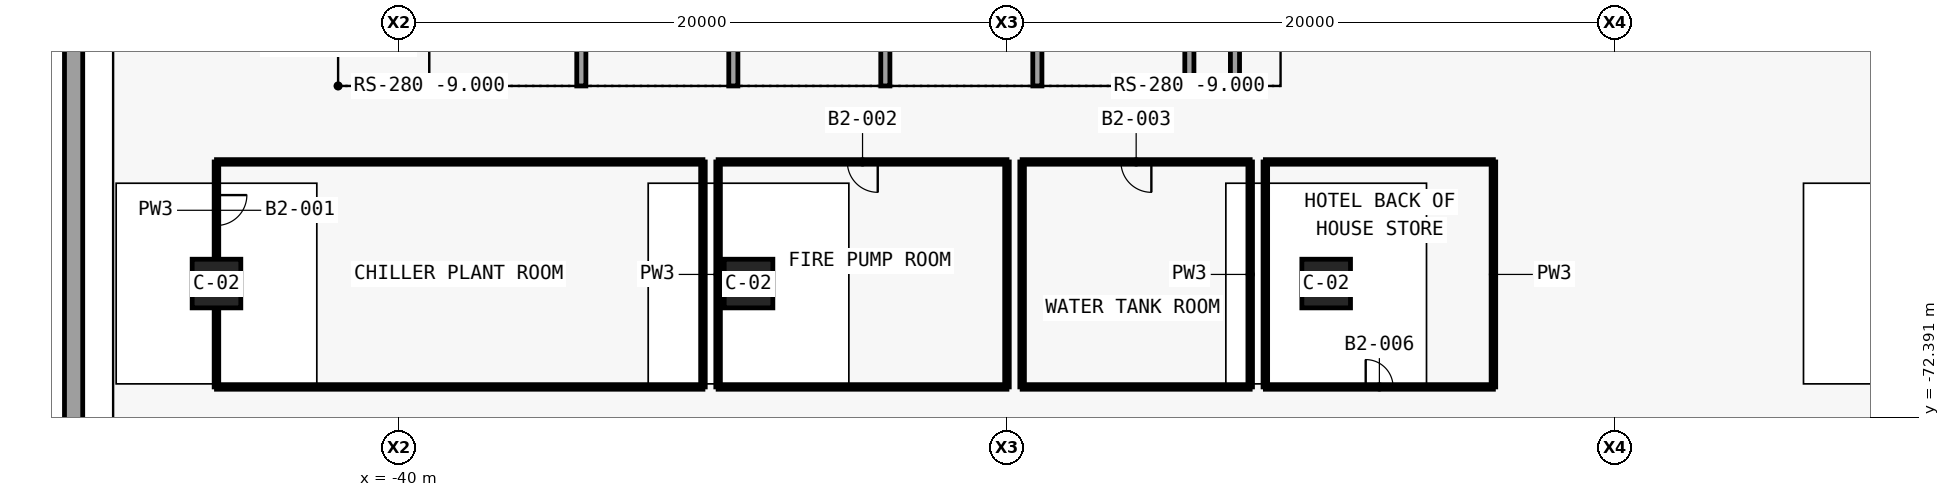
"""IFC4 building model, lengths in metres.
Left out: names, types, materials, properties, quantities, classifications, styles, units other than length and angle.
Written with IfcOpenShell. Run it as: python <this file> out.ifc"""

import sys

from ifc_helpers import new_model, si_unit, direction, frame, frame_2d, origin, origin_2d, place, context, subcontext, project, spatial, polyline, rectangle, outline, extrude, element, fill, save


model = new_model("IFC4")
c1 = context("Model", 3, precision=1e-05, world=origin(), true_north=direction((0.0, 1.0)))
c2 = subcontext(c1, "Body", "Model", "MODEL_VIEW")
j1 = project(units=[si_unit("LENGTHUNIT", "METRE"), si_unit("PLANEANGLEUNIT", "RADIAN")], contexts=[c1])
p1 = place(None, origin())
s1 = spatial("IfcSite", under=j1, at=p1, CompositionType="ELEMENT")
p2 = place(p1, origin())
s2 = spatial("IfcBuilding", under=s1, at=p2, CompositionType="ELEMENT")
p3 = place(p2, frame((0.0, 0.0, -9.0)))
s3 = spatial("IfcBuildingStorey", under=s2, at=p3, CompositionType="ELEMENT", Elevation=-9.0)
p4 = place(p3, frame((-50.7, -1.0, 0.0), z_axis=(0.0, 0.0, 1.0), x_axis=(0.0, -1.0, 0.0)))
e1 = element("IfcWall", 1, at=p4, inside=s3, PredefinedType="SOLIDWALL", context=c2, shape_type="SweptSolid", body=[
    extrude(outline(polyline([(81.4, 0.3), (81.4, -0.3), (0.6, -0.3), (0.6, 0.3), (81.4, 0.3)])), origin(), (0.0, 0.0, 1.0), 4.5),
])
for number, where, z_axis, x_axis in (
    (2, (-46.0, -68.0, 0.0), (0.0, 0.0, 1.0), (1.0, 0.0, 0.0)),
    (3, (-28.5, -68.0, 0.0), (0.0, 0.0, 1.0), (1.0, 0.0, 0.0)),
    (4, (-9.5, -68.0, 0.0), (0.0, 0.0, 1.0), (1.0, 0.0, 0.0)),
):
    element("IfcColumn", number, at=place(p3, frame(where, z_axis=z_axis, x_axis=x_axis)), inside=s3, PredefinedType="COLUMN", context=c2, shape_type="SweptSolid", body=[
        extrude(rectangle(XDim=1.6, YDim=1.6, at=origin_2d()), origin(), (0.0, 0.0, 1.0), 4.5),
    ])
p5 = place(p3, frame((-34.0, -61.5, 0.0), z_axis=(0.0, 0.0, 1.0), x_axis=(0.0, 1.0, 0.0)))
e5 = element("IfcWall", 5, at=p5, inside=s3, PredefinedType="SOLIDWALL", context=c2, shape_type="SweptSolid", body=[
    extrude(rectangle(XDim=7.0, YDim=0.3, at=frame_2d((3.5, 0.0))), origin(), (0.0, 0.0, 1.0), 0.764),
])
p6 = place(p3, frame((-29.0, -61.5, 0.0), z_axis=(0.0, 0.0, 1.0), x_axis=(0.0, 1.0, 0.0)))
e6 = element("IfcWall", 6, at=p6, inside=s3, PredefinedType="SOLIDWALL", context=c2, shape_type="SweptSolid", body=[
    extrude(rectangle(XDim=7.0, YDim=0.3, at=frame_2d((3.5, 0.0))), origin(), (0.0, 0.0, 1.0), 1.552),
])
p7 = place(p3, frame((-24.0, -61.5, 0.0), z_axis=(0.0, 0.0, 1.0), x_axis=(0.0, 1.0, 0.0)))
e7 = element("IfcWall", 7, at=p7, inside=s3, PredefinedType="SOLIDWALL", context=c2, shape_type="SweptSolid", body=[
    extrude(rectangle(XDim=7.0, YDim=0.3, at=frame_2d((3.5, 0.0))), origin(), (0.0, 0.0, 1.0), 2.34),
])
p8 = place(p3, frame((-19.0, -61.5, 0.0), z_axis=(0.0, 0.0, 1.0), x_axis=(0.0, 1.0, 0.0)))
e8 = element("IfcWall", 8, at=p8, inside=s3, PredefinedType="SOLIDWALL", context=c2, shape_type="SweptSolid", body=[
    extrude(rectangle(XDim=7.0, YDim=0.3, at=frame_2d((3.5, 0.0))), origin(), (0.0, 0.0, 1.0), 3.128),
])
p9 = place(p3, frame((-14.0, -61.5, 0.0), z_axis=(0.0, 0.0, 1.0), x_axis=(0.0, 1.0, 0.0)))
e9 = element("IfcWall", 9, at=p9, inside=s3, PredefinedType="SOLIDWALL", context=c2, shape_type="SweptSolid", body=[
    extrude(rectangle(XDim=7.0, YDim=0.3, at=frame_2d((3.5, 0.0))), origin(), (0.0, 0.0, 1.0), 3.917),
])
p10 = place(p3, frame((-12.5, -61.5, 0.0), z_axis=(0.0, 0.0, 1.0), x_axis=(0.0, 1.0, 0.0)))
e10 = element("IfcWall", 10, at=p10, inside=s3, PredefinedType="SOLIDWALL", context=c2, shape_type="SweptSolid", body=[
    extrude(rectangle(XDim=7.0, YDim=0.3, at=frame_2d((3.5, 0.0))), origin(), (0.0, 0.0, 1.0), 4.066),
])
p11 = place(p3, frame((-46.001, -64.0, 0.0), z_axis=(0.0, 0.0, 1.0), x_axis=(0.0, -1.0, 0.0)))
e11 = element("IfcWall", 11, at=p11, inside=s3, PredefinedType="PARTITIONING", context=c2, shape_type="SweptSolid", body=[
    extrude(rectangle(XDim=3.18, YDim=0.15, at=frame_2d((1.59, 0.0))), origin(), (0.0, 0.0, 1.0), 3.07),
])
p12 = place(p11, frame((1.09, 0.0, 0.0)))
e12 = element("IfcOpeningElement", 12, at=p12, cuts=e11, PredefinedType="OPENING", context=c2, shape_type="SweptSolid", body=[
    extrude(rectangle(XDim=1.0, YDim=2.1, at=frame_2d((0.5, 1.05))), frame((0.0, 0.085, 0.0), z_axis=(0.0, -1.0, 0.0), x_axis=(1.0, 0.0, 0.0)), (0.0, 0.0, 1.0), 0.17),
])
p13 = place(p3, frame((-46.001, -68.82, 0.0), z_axis=(0.0, 0.0, 1.0), x_axis=(0.0, -1.0, 0.0)))
e13 = element("IfcWall", 13, at=p13, inside=s3, PredefinedType="PARTITIONING", context=c2, shape_type="SweptSolid", body=[
    extrude(rectangle(XDim=2.58, YDim=0.15, at=frame_2d((1.29, 0.0))), origin(), (0.0, 0.0, 1.0), 4.09),
])
p14 = place(p3, frame((-46.0, -71.401, 0.0), z_axis=(0.0, 0.0, 1.0), x_axis=(1.0, 0.0, 0.0)))
e14 = element("IfcWall", 14, at=p14, inside=s3, PredefinedType="PARTITIONING", context=c2, shape_type="SweptSolid", body=[
    extrude(rectangle(XDim=16.0, YDim=0.15, at=frame_2d((8.0, 0.0))), origin(), (0.0, 0.0, 1.0), 4.09),
])
p15 = place(p3, frame((-29.999, -71.4, 0.0), z_axis=(0.0, 0.0, 1.0), x_axis=(0.0, 1.0, 0.0)))
e15 = element("IfcWall", 15, at=p15, inside=s3, PredefinedType="PARTITIONING", context=c2, shape_type="SweptSolid", body=[
    extrude(rectangle(XDim=7.4, YDim=0.15, at=frame_2d((3.7, 0.0))), origin(), (0.0, 0.0, 1.0), 3.07),
])
p16 = place(p3, frame((-30.0, -63.999, 0.0), z_axis=(0.0, 0.0, 1.0), x_axis=(-1.0, 0.0, 0.0)))
e16 = element("IfcWall", 16, at=p16, inside=s3, PredefinedType="PARTITIONING", context=c2, shape_type="SweptSolid", body=[
    extrude(rectangle(XDim=16.0, YDim=0.15, at=frame_2d((8.0, 0.0))), origin(), (0.0, 0.0, 1.0), 3.07),
])
p17 = place(p3, frame((-20.0, -63.999, 0.0), z_axis=(0.0, 0.0, 1.0), x_axis=(-1.0, 0.0, 0.0)))
e17 = element("IfcWall", 17, at=p17, inside=s3, PredefinedType="PARTITIONING", context=c2, shape_type="SweptSolid", body=[
    extrude(rectangle(XDim=9.5, YDim=0.15, at=frame_2d((4.75, 0.0))), origin(), (0.0, 0.0, 1.0), 3.07),
])
p18 = place(p17, frame((4.25, 0.0, 0.0)))
e18 = element("IfcOpeningElement", 18, at=p18, cuts=e17, PredefinedType="OPENING", context=c2, shape_type="SweptSolid", body=[
    extrude(rectangle(XDim=1.0, YDim=2.1, at=frame_2d((0.5, 1.05))), frame((0.0, 0.085, 0.0), z_axis=(0.0, -1.0, 0.0), x_axis=(1.0, 0.0, 0.0)), (0.0, 0.0, 1.0), 0.17),
])
p19 = place(p3, frame((-29.501, -64.0, 0.0), z_axis=(0.0, 0.0, 1.0), x_axis=(0.0, -1.0, 0.0)))
e19 = element("IfcWall", 19, at=p19, inside=s3, PredefinedType="PARTITIONING", context=c2, shape_type="SweptSolid", body=[
    extrude(rectangle(XDim=7.4, YDim=0.15, at=frame_2d((3.7, 0.0))), origin(), (0.0, 0.0, 1.0), 3.07),
])
p20 = place(p3, frame((-29.5, -71.401, 0.0), z_axis=(0.0, 0.0, 1.0), x_axis=(1.0, 0.0, 0.0)))
e20 = element("IfcWall", 20, at=p20, inside=s3, PredefinedType="PARTITIONING", context=c2, shape_type="SweptSolid", body=[
    extrude(rectangle(XDim=9.5, YDim=0.15, at=frame_2d((4.75, 0.0))), origin(), (0.0, 0.0, 1.0), 3.07),
])
p21 = place(p3, frame((-19.999, -71.4, 0.0), z_axis=(0.0, 0.0, 1.0), x_axis=(0.0, 1.0, 0.0)))
e21 = element("IfcWall", 21, at=p21, inside=s3, PredefinedType="PARTITIONING", context=c2, shape_type="SweptSolid", body=[
    extrude(rectangle(XDim=7.4, YDim=0.15, at=frame_2d((3.7, 0.0))), origin(), (0.0, 0.0, 1.0), 3.07),
])
p22 = place(p3, frame((-12.0, -63.999, 0.0), z_axis=(0.0, 0.0, 1.0), x_axis=(-1.0, 0.0, 0.0)))
e22 = element("IfcWall", 22, at=p22, inside=s3, PredefinedType="PARTITIONING", context=c2, shape_type="SweptSolid", body=[
    extrude(rectangle(XDim=7.5, YDim=0.15, at=frame_2d((3.75, 0.0))), origin(), (0.0, 0.0, 1.0), 3.47),
])
p23 = place(p22, frame((3.25, 0.0, 0.0)))
e23 = element("IfcOpeningElement", 23, at=p23, cuts=e22, PredefinedType="OPENING", context=c2, shape_type="SweptSolid", body=[
    extrude(rectangle(XDim=1.0, YDim=2.1, at=frame_2d((0.5, 1.05))), frame((0.0, 0.085, 0.0), z_axis=(0.0, -1.0, 0.0), x_axis=(1.0, 0.0, 0.0)), (0.0, 0.0, 1.0), 0.17),
])
p24 = place(p3, frame((-19.501, -64.0, 0.0), z_axis=(0.0, 0.0, 1.0), x_axis=(0.0, -1.0, 0.0)))
e24 = element("IfcWall", 24, at=p24, inside=s3, PredefinedType="PARTITIONING", context=c2, shape_type="SweptSolid", body=[
    extrude(rectangle(XDim=7.4, YDim=0.15, at=frame_2d((3.7, 0.0))), origin(), (0.0, 0.0, 1.0), 3.07),
])
p25 = place(p3, frame((-19.5, -71.401, 0.0), z_axis=(0.0, 0.0, 1.0), x_axis=(1.0, 0.0, 0.0)))
e25 = element("IfcWall", 25, at=p25, inside=s3, PredefinedType="PARTITIONING", context=c2, shape_type="SweptSolid", body=[
    extrude(rectangle(XDim=7.5, YDim=0.15, at=frame_2d((3.75, 0.0))), origin(), (0.0, 0.0, 1.0), 4.09),
])
for number, where, z_axis, x_axis in (
    (26, (-11.999, -71.4, 0.0), (0.0, 0.0, 1.0), (0.0, 1.0, 0.0)),
    (27, (-11.501, -64.0, 0.0), (0.0, 0.0, 1.0), (0.0, -1.0, 0.0)),
):
    element("IfcWall", number, at=place(p3, frame(where, z_axis=z_axis, x_axis=x_axis)), inside=s3, PredefinedType="PARTITIONING", context=c2, shape_type="SweptSolid", body=[
        extrude(rectangle(XDim=7.4, YDim=0.15, at=frame_2d((3.7, 0.0))), origin(), (0.0, 0.0, 1.0), 3.07),
    ])
p26 = place(p3, frame((-11.5, -71.401, 0.0), z_axis=(0.0, 0.0, 1.0), x_axis=(1.0, 0.0, 0.0)))
e28 = element("IfcWall", 28, at=p26, inside=s3, PredefinedType="PARTITIONING", context=c2, shape_type="SweptSolid", body=[
    extrude(rectangle(XDim=7.5, YDim=0.15, at=frame_2d((3.75, 0.0))), origin(), (0.0, 0.0, 1.0), 4.09),
])
p27 = place(p26, frame((3.3, 0.0, 0.0)))
e29 = element("IfcOpeningElement", 29, at=p27, cuts=e28, PredefinedType="OPENING", context=c2, shape_type="SweptSolid", body=[
    extrude(rectangle(XDim=0.9, YDim=2.1, at=frame_2d((0.45, 1.05))), frame((0.0, 0.085, 0.0), z_axis=(0.0, -1.0, 0.0), x_axis=(1.0, 0.0, 0.0)), (0.0, 0.0, 1.0), 0.17),
])
p28 = place(p3, frame((-3.999, -71.4, 0.0), z_axis=(0.0, 0.0, 1.0), x_axis=(0.0, 1.0, 0.0)))
e30 = element("IfcWall", 30, at=p28, inside=s3, PredefinedType="PARTITIONING", context=c2, shape_type="SweptSolid", body=[
    extrude(rectangle(XDim=7.4, YDim=0.15, at=frame_2d((3.7, 0.0))), origin(), (0.0, 0.0, 1.0), 3.07),
])
p29 = place(p3, frame((-4.0, -63.999, 0.0), z_axis=(0.0, 0.0, 1.0), x_axis=(-1.0, 0.0, 0.0)))
e31 = element("IfcWall", 31, at=p29, inside=s3, PredefinedType="PARTITIONING", context=c2, shape_type="SweptSolid", body=[
    extrude(rectangle(XDim=7.5, YDim=0.15, at=frame_2d((3.75, 0.0))), origin(), (0.0, 0.0, 1.0), 3.07),
])
p30 = place(p12, origin())
e32 = element("IfcDoor", 32, at=p30, inside=s3, OperationType="SINGLE_SWING_RIGHT", PredefinedType="DOOR", context=c2, shape_type="SweptSolid", body=[
    extrude(rectangle(XDim=1.0, YDim=2.1, at=frame_2d((0.5, 1.05))), frame((0.0, 0.025, 0.0), z_axis=(0.0, -1.0, 0.0), x_axis=(1.0, 0.0, 0.0)), (0.0, 0.0, 1.0), 0.05),
])
fill(e12, e32)
p31 = place(p18, origin())
e33 = element("IfcDoor", 33, at=p31, inside=s3, OperationType="SINGLE_SWING_LEFT", PredefinedType="DOOR", context=c2, shape_type="SweptSolid", body=[
    extrude(rectangle(XDim=1.0, YDim=2.1, at=frame_2d((0.5, 1.05))), frame((0.0, 0.025, 0.0), z_axis=(0.0, -1.0, 0.0), x_axis=(1.0, 0.0, 0.0)), (0.0, 0.0, 1.0), 0.05),
])
fill(e18, e33)
p32 = place(p23, origin())
e34 = element("IfcDoor", 34, at=p32, inside=s3, OperationType="SINGLE_SWING_RIGHT", PredefinedType="DOOR", context=c2, shape_type="SweptSolid", body=[
    extrude(rectangle(XDim=1.0, YDim=2.1, at=frame_2d((0.5, 1.05))), frame((0.0, 0.025, 0.0), z_axis=(0.0, -1.0, 0.0), x_axis=(1.0, 0.0, 0.0)), (0.0, 0.0, 1.0), 0.05),
])
fill(e23, e34)
p33 = place(p27, origin())
e35 = element("IfcDoor", 35, at=p33, inside=s3, OperationType="SINGLE_SWING_RIGHT", PredefinedType="DOOR", context=c2, shape_type="SweptSolid", body=[
    extrude(rectangle(XDim=0.9, YDim=2.1, at=frame_2d((0.45, 1.05))), frame((0.0, 0.025, 0.0), z_axis=(0.0, -1.0, 0.0), x_axis=(1.0, 0.0, 0.0)), (0.0, 0.0, 1.0), 0.05),
])
fill(e29, e35)
save(model, sys.argv[1])
